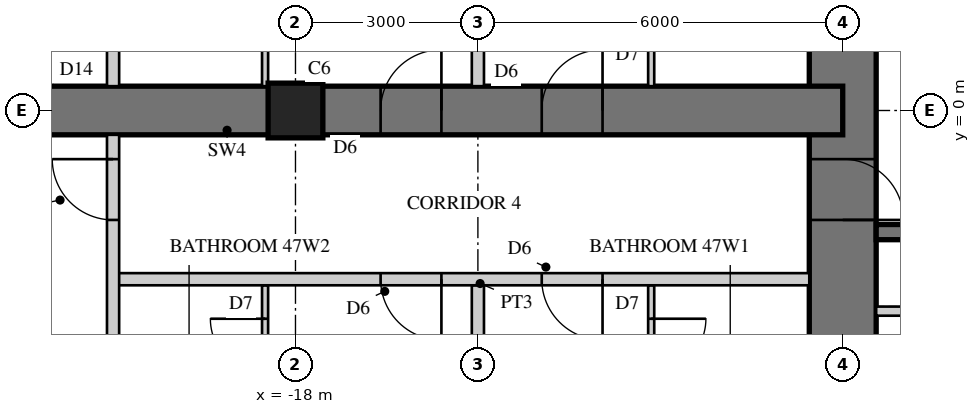
"""IFC4 building model, lengths in metres.
Left out: names, types, materials, properties, quantities, classifications, styles, units other than length and angle.
Written with IfcOpenShell. Run it as: python <this file> out.ifc"""

import sys

from ifc_helpers import new_model, si_unit, direction, frame, frame_2d, origin, origin_2d, place, context, subcontext, project, spatial, rectangle, extrude, element, fill, save


model = new_model("IFC4")
c1 = context("Model", 3, precision=1e-05, world=origin(), true_north=direction((0.0, 1.0)))
c2 = subcontext(c1, "Body", "Model", "MODEL_VIEW")
j1 = project(units=[si_unit("LENGTHUNIT", "METRE"), si_unit("PLANEANGLEUNIT", "RADIAN")], contexts=[c1])
p1 = place(None, origin())
s1 = spatial("IfcSite", under=j1, at=p1, CompositionType="ELEMENT")
p2 = place(p1, origin())
s2 = spatial("IfcBuilding", under=s1, at=p2, CompositionType="ELEMENT")
p3 = place(p2, frame((0.0, 0.0, 189.9)))
s3 = spatial("IfcBuildingStorey", under=s2, at=p3, CompositionType="ELEMENT", Elevation=189.9)
p4 = place(p3, frame((-9.0, 9.0, 0.0), z_axis=(0.0, 0.0, 1.0), x_axis=(0.0, -1.0, 0.0)))
e1 = element("IfcWall", 1, at=p4, inside=s3, PredefinedType="SHEAR", context=c2, shape_type="SweptSolid", body=[
    extrude(rectangle(XDim=18.0, YDim=1.1, at=frame_2d((9.0, 0.0))), origin(), (0.0, 0.0, 1.0), 3.4),
])
p5 = place(p4, frame((9.8, 0.0, 0.0)))
e2 = element("IfcOpeningElement", 2, at=p5, cuts=e1, PredefinedType="OPENING", context=c2, shape_type="SweptSolid", body=[
    extrude(rectangle(XDim=1.0, YDim=2.4, at=frame_2d((0.5, 1.2))), frame((0.0, 0.56, 0.0), z_axis=(0.0, -1.0, 0.0), x_axis=(1.0, 0.0, 0.0)), (0.0, 0.0, 1.0), 1.12),
])
p6 = place(p3, frame((-1.925, -2.0, 0.0), z_axis=(0.0, 0.0, 1.0), x_axis=(-1.0, 0.0, 0.0)))
e3 = element("IfcWall", 3, at=p6, inside=s3, PredefinedType="SHEAR", context=c2, shape_type="SweptSolid", body=[
    extrude(rectangle(XDim=6.525, YDim=0.25, at=frame_2d((3.262, 0.0))), origin(), (0.0, 0.0, 1.0), 3.4),
])
p7 = place(p3, frame((-1.925, -3.3, 0.0), z_axis=(0.0, 0.0, 1.0), x_axis=(-1.0, 0.0, 0.0)))
e4 = element("IfcWall", 4, at=p7, inside=s3, PredefinedType="PARTITIONING", context=c2, shape_type="SweptSolid", body=[
    extrude(rectangle(XDim=6.525, YDim=0.15, at=frame_2d((3.262, 0.0))), origin(), (0.0, 0.0, 1.0), 3.4),
])
p8 = place(p7, frame((0.075, 0.0, 0.0)))
e5 = element("IfcOpeningElement", 5, at=p8, cuts=e4, PredefinedType="OPENING", context=c2, shape_type="SweptSolid", body=[
    extrude(rectangle(XDim=0.8, YDim=2.1, at=frame_2d((0.4, 1.05))), frame((0.0, 0.085, 0.0), z_axis=(0.0, -1.0, 0.0), x_axis=(1.0, 0.0, 0.0)), (0.0, 0.0, 1.0), 0.17),
])
p9 = place(p7, frame((3.675, 0.0, 0.0)))
e6 = element("IfcOpeningElement", 6, at=p9, cuts=e4, PredefinedType="OPENING", context=c2, shape_type="SweptSolid", body=[
    extrude(rectangle(XDim=0.8, YDim=2.1, at=frame_2d((0.4, 1.05))), frame((0.0, 0.085, 0.0), z_axis=(0.0, -1.0, 0.0), x_axis=(1.0, 0.0, 0.0)), (0.0, 0.0, 1.0), 0.17),
])
p10 = place(p3, frame((-9.0, 0.0, 0.0), z_axis=(0.0, 0.0, 1.0), x_axis=(-1.0, 0.0, 0.0)))
e7 = element("IfcWall", 7, at=p10, inside=s3, PredefinedType="SHEAR", context=c2, shape_type="SweptSolid", body=[
    extrude(rectangle(XDim=18.0, YDim=0.8, at=frame_2d((9.0, 0.0))), origin(), (0.0, 0.0, 1.0), 3.4),
])
p11 = place(p10, frame((3.95, 0.0, 0.0)))
e8 = element("IfcOpeningElement", 8, at=p11, cuts=e7, PredefinedType="OPENING", context=c2, shape_type="SweptSolid", body=[
    extrude(rectangle(XDim=1.0, YDim=2.15, at=frame_2d((0.5, 1.075))), frame((0.0, 0.41, 0.0), z_axis=(0.0, -1.0, 0.0), x_axis=(1.0, 0.0, 0.0)), (0.0, 0.0, 1.0), 0.82),
])
p12 = place(p10, frame((6.6, 0.0, 0.0)))
e9 = element("IfcOpeningElement", 9, at=p12, cuts=e7, PredefinedType="OPENING", context=c2, shape_type="SweptSolid", body=[
    extrude(rectangle(XDim=1.0, YDim=2.15, at=frame_2d((0.5, 1.075))), frame((0.0, 0.41, 0.0), z_axis=(0.0, -1.0, 0.0), x_axis=(1.0, 0.0, 0.0)), (0.0, 0.0, 1.0), 0.82),
])
p13 = place(p10, frame((13.25, 0.0, 0.0)))
e10 = element("IfcOpeningElement", 10, at=p13, cuts=e7, PredefinedType="OPENING", context=c2, shape_type="SweptSolid", body=[
    extrude(rectangle(XDim=1.0, YDim=2.2, at=frame_2d((0.5, 1.1))), frame((0.0, 0.41, 0.0), z_axis=(0.0, -1.0, 0.0), x_axis=(1.0, 0.0, 0.0)), (0.0, 0.0, 1.0), 0.82),
])
p14 = place(p3, frame((-18.0, 0.0, 0.0), z_axis=(0.0, 0.0, 1.0), x_axis=(1.0, 0.0, 0.0)))
e11 = element("IfcColumn", 11, at=p14, inside=s3, PredefinedType="COLUMN", context=c2, shape_type="SweptSolid", body=[
    extrude(rectangle(XDim=0.9, YDim=0.9, at=origin_2d()), origin(), (0.0, 0.0, 1.0), 3.4),
])
p15 = place(p3, frame((-12.15, -2.875, 0.0), z_axis=(0.0, 0.0, 1.0), x_axis=(0.0, -1.0, 0.0)))
e12 = element("IfcWall", 12, at=p15, inside=s3, PredefinedType="PARTITIONING", context=c2, shape_type="SweptSolid", body=[
    extrude(rectangle(XDim=2.2, YDim=0.1, at=frame_2d((1.1, 0.0))), origin(), (0.0, 0.0, 1.0), 3.22),
])
p16 = place(p15, frame((0.55, 0.0, 0.0)))
e13 = element("IfcOpeningElement", 13, at=p16, cuts=e12, PredefinedType="OPENING", context=c2, shape_type="SweptSolid", body=[
    extrude(rectangle(XDim=0.9, YDim=2.1, at=frame_2d((0.45, 1.05))), frame((0.0, 0.06, 0.0), z_axis=(0.0, -1.0, 0.0), x_axis=(1.0, 0.0, 0.0)), (0.0, 0.0, 1.0), 0.12),
])
p17 = place(p3, frame((-12.15, 2.6, 0.0), z_axis=(0.0, 0.0, 1.0), x_axis=(0.0, -1.0, 0.0)))
e14 = element("IfcWall", 14, at=p17, inside=s3, PredefinedType="PARTITIONING", context=c2, shape_type="SweptSolid", body=[
    extrude(rectangle(XDim=2.2, YDim=0.1, at=frame_2d((1.1, 0.0))), origin(), (0.0, 0.0, 1.0), 3.22),
])
p18 = place(p17, frame((0.55, 0.0, 0.0)))
e15 = element("IfcOpeningElement", 15, at=p18, cuts=e14, PredefinedType="OPENING", context=c2, shape_type="SweptSolid", body=[
    extrude(rectangle(XDim=0.9, YDim=2.1, at=frame_2d((0.45, 1.05))), frame((0.0, 0.06, 0.0), z_axis=(0.0, -1.0, 0.0), x_axis=(1.0, 0.0, 0.0)), (0.0, 0.0, 1.0), 0.12),
])
p19 = place(p3, frame((-15.0, -2.875, 0.0), z_axis=(0.0, 0.0, 1.0), x_axis=(0.0, -1.0, 0.0)))
e16 = element("IfcWall", 16, at=p19, inside=s3, PredefinedType="SOLIDWALL", context=c2, shape_type="SweptSolid", body=[
    extrude(rectangle(XDim=5.675, YDim=0.2, at=frame_2d((2.837, 0.0))), origin(), (0.0, 0.0, 1.0), 2.47),
])
p20 = place(p3, frame((-15.0, 8.55, 0.0), z_axis=(0.0, 0.0, 1.0), x_axis=(0.0, -1.0, 0.0)))
e17 = element("IfcWall", 17, at=p20, inside=s3, PredefinedType="SOLIDWALL", context=c2, shape_type="SweptSolid", body=[
    extrude(rectangle(XDim=8.15, YDim=0.2, at=frame_2d((4.075, 0.0))), origin(), (0.0, 0.0, 1.0), 2.47),
])
p21 = place(p3, frame((-18.5, -2.875, 0.0), z_axis=(0.0, 0.0, 1.0), x_axis=(0.0, -1.0, 0.0)))
e18 = element("IfcWall", 18, at=p21, inside=s3, PredefinedType="PARTITIONING", context=c2, shape_type="SweptSolid", body=[
    extrude(rectangle(XDim=2.2, YDim=0.1, at=frame_2d((1.1, 0.0))), origin(), (0.0, 0.0, 1.0), 3.22),
])
p22 = place(p21, frame((0.55, 0.0, 0.0)))
e19 = element("IfcOpeningElement", 19, at=p22, cuts=e18, PredefinedType="OPENING", context=c2, shape_type="SweptSolid", body=[
    extrude(rectangle(XDim=0.9, YDim=2.1, at=frame_2d((0.45, 1.05))), frame((0.0, 0.06, 0.0), z_axis=(0.0, -1.0, 0.0), x_axis=(1.0, 0.0, 0.0)), (0.0, 0.0, 1.0), 0.12),
])
p23 = place(p3, frame((-18.5, 3.0, 0.0), z_axis=(0.0, 0.0, 1.0), x_axis=(0.0, -1.0, 0.0)))
e20 = element("IfcWall", 20, at=p23, inside=s3, PredefinedType="PARTITIONING", context=c2, shape_type="SweptSolid", body=[
    extrude(rectangle(XDim=2.6, YDim=0.1, at=frame_2d((1.3, 0.0))), origin(), (0.0, 0.0, 1.0), 3.22),
])
p24 = place(p23, frame((0.55, 0.0, 0.0)))
e21 = element("IfcOpeningElement", 21, at=p24, cuts=e20, PredefinedType="OPENING", context=c2, shape_type="SweptSolid", body=[
    extrude(rectangle(XDim=0.9, YDim=2.1, at=frame_2d((0.45, 1.05))), frame((0.0, 0.06, 0.0), z_axis=(0.0, -1.0, 0.0), x_axis=(1.0, 0.0, 0.0)), (0.0, 0.0, 1.0), 0.12),
])
p25 = place(p3, frame((-9.55, -2.775, 0.0), z_axis=(0.0, 0.0, 1.0), x_axis=(-1.0, 0.0, 0.0)))
e22 = element("IfcWall", 22, at=p25, inside=s3, PredefinedType="SOLIDWALL", context=c2, shape_type="SweptSolid", body=[
    extrude(rectangle(XDim=11.45, YDim=0.2, at=frame_2d((5.725, 0.0))), origin(), (0.0, 0.0, 1.0), 3.22),
])
p26 = place(p25, frame((3.4, 0.0, 0.0)))
e23 = element("IfcOpeningElement", 23, at=p26, cuts=e22, PredefinedType="OPENING", context=c2, shape_type="SweptSolid", body=[
    extrude(rectangle(XDim=1.0, YDim=2.15, at=frame_2d((0.5, 1.075))), frame((0.0, 0.11, 0.0), z_axis=(0.0, -1.0, 0.0), x_axis=(1.0, 0.0, 0.0)), (0.0, 0.0, 1.0), 0.22),
])
p27 = place(p25, frame((6.05, 0.0, 0.0)))
e24 = element("IfcOpeningElement", 24, at=p27, cuts=e22, PredefinedType="OPENING", context=c2, shape_type="SweptSolid", body=[
    extrude(rectangle(XDim=1.0, YDim=2.15, at=frame_2d((0.5, 1.075))), frame((0.0, 0.11, 0.0), z_axis=(0.0, -1.0, 0.0), x_axis=(1.0, 0.0, 0.0)), (0.0, 0.0, 1.0), 0.22),
])
p28 = place(p3, frame((-21.0, 9.0, 0.0), z_axis=(0.0, 0.0, 1.0), x_axis=(0.0, -1.0, 0.0)))
e25 = element("IfcWall", 25, at=p28, inside=s3, PredefinedType="SOLIDWALL", context=c2, shape_type="SweptSolid", body=[
    extrude(rectangle(XDim=8.6, YDim=0.2, at=frame_2d((4.3, 0.0))), origin(), (0.0, 0.0, 1.0), 2.62),
])
p29 = place(p3, frame((-21.0, -0.4, 0.0), z_axis=(0.0, 0.0, 1.0), x_axis=(0.0, -1.0, 0.0)))
e26 = element("IfcWall", 26, at=p29, inside=s3, PredefinedType="SOLIDWALL", context=c2, shape_type="SweptSolid", body=[
    extrude(rectangle(XDim=8.6, YDim=0.2, at=frame_2d((4.3, 0.0))), origin(), (0.0, 0.0, 1.0), 2.62),
])
p30 = place(p29, frame((0.4, 0.0, 0.0)))
e27 = element("IfcOpeningElement", 27, at=p30, cuts=e26, PredefinedType="OPENING", context=c2, shape_type="SweptSolid", body=[
    extrude(rectangle(XDim=1.0, YDim=2.2, at=frame_2d((0.5, 1.1))), frame((0.0, 0.11, 0.0), z_axis=(0.0, -1.0, 0.0), x_axis=(1.0, 0.0, 0.0)), (0.0, 0.0, 1.0), 0.22),
])
p31 = place(p16, origin())
e28 = element("IfcDoor", 28, at=p31, inside=s3, OperationType="SINGLE_SWING_LEFT", PredefinedType="DOOR", context=c2, shape_type="SweptSolid", body=[
    extrude(rectangle(XDim=0.9, YDim=2.1, at=frame_2d((0.45, 1.05))), frame((0.0, 0.025, 0.0), z_axis=(0.0, -1.0, 0.0), x_axis=(1.0, 0.0, 0.0)), (0.0, 0.0, 1.0), 0.05),
])
fill(e13, e28)
p32 = place(p22, frame((0.9, 0.0, 0.0), z_axis=(0.0, 0.0, 1.0), x_axis=(-1.0, 0.0, 0.0)))
e29 = element("IfcDoor", 29, at=p32, inside=s3, OperationType="SINGLE_SWING_RIGHT", PredefinedType="DOOR", context=c2, shape_type="SweptSolid", body=[
    extrude(rectangle(XDim=0.9, YDim=2.1, at=frame_2d((0.45, 1.05))), frame((0.0, 0.025, 0.0), z_axis=(0.0, -1.0, 0.0), x_axis=(1.0, 0.0, 0.0)), (0.0, 0.0, 1.0), 0.05),
])
fill(e19, e29)
p33 = place(p26, origin())
e30 = element("IfcDoor", 30, at=p33, inside=s3, OperationType="SINGLE_SWING_LEFT", PredefinedType="DOOR", context=c2, shape_type="SweptSolid", body=[
    extrude(rectangle(XDim=1.0, YDim=2.15, at=frame_2d((0.5, 1.075))), frame((0.0, 0.025, 0.0), z_axis=(0.0, -1.0, 0.0), x_axis=(1.0, 0.0, 0.0)), (0.0, 0.0, 1.0), 0.05),
])
fill(e23, e30)
p34 = place(p27, origin())
e31 = element("IfcDoor", 31, at=p34, inside=s3, OperationType="SINGLE_SWING_LEFT", PredefinedType="DOOR", context=c2, shape_type="SweptSolid", body=[
    extrude(rectangle(XDim=1.0, YDim=2.15, at=frame_2d((0.5, 1.075))), frame((0.0, 0.025, 0.0), z_axis=(0.0, -1.0, 0.0), x_axis=(1.0, 0.0, 0.0)), (0.0, 0.0, 1.0), 0.05),
])
fill(e24, e31)
p35 = place(p30, frame((1.0, 0.0, 0.0), z_axis=(0.0, 0.0, 1.0), x_axis=(-1.0, 0.0, 0.0)))
e32 = element("IfcDoor", 32, at=p35, inside=s3, OperationType="SINGLE_SWING_RIGHT", PredefinedType="DOOR", context=c2, shape_type="SweptSolid", body=[
    extrude(rectangle(XDim=1.0, YDim=2.2, at=frame_2d((0.5, 1.1))), frame((0.0, 0.025, 0.0), z_axis=(0.0, -1.0, 0.0), x_axis=(1.0, 0.0, 0.0)), (0.0, 0.0, 1.0), 0.05),
])
fill(e27, e32)
p36 = place(p11, frame((1.0, 0.0, 0.0), z_axis=(0.0, 0.0, 1.0), x_axis=(-1.0, 0.0, 0.0)))
e33 = element("IfcDoor", 33, at=p36, inside=s3, OperationType="SINGLE_SWING_RIGHT", PredefinedType="DOOR", context=c2, shape_type="SweptSolid", body=[
    extrude(rectangle(XDim=1.0, YDim=2.15, at=frame_2d((0.5, 1.075))), frame((0.0, 0.025, 0.0), z_axis=(0.0, -1.0, 0.0), x_axis=(1.0, 0.0, 0.0)), (0.0, 0.0, 1.0), 0.05),
])
fill(e8, e33)
p37 = place(p12, frame((1.0, 0.0, 0.0), z_axis=(0.0, 0.0, 1.0), x_axis=(-1.0, 0.0, 0.0)))
e34 = element("IfcDoor", 34, at=p37, inside=s3, OperationType="SINGLE_SWING_RIGHT", PredefinedType="DOOR", context=c2, shape_type="SweptSolid", body=[
    extrude(rectangle(XDim=1.0, YDim=2.15, at=frame_2d((0.5, 1.075))), frame((0.0, 0.025, 0.0), z_axis=(0.0, -1.0, 0.0), x_axis=(1.0, 0.0, 0.0)), (0.0, 0.0, 1.0), 0.05),
])
fill(e9, e34)
p38 = place(p5, origin())
e35 = element("IfcDoor", 35, at=p38, inside=s3, OperationType="SINGLE_SWING_RIGHT", PredefinedType="DOOR", context=c2, shape_type="SweptSolid", body=[
    extrude(rectangle(XDim=1.0, YDim=2.4, at=frame_2d((0.5, 1.2))), frame((0.0, 0.055, 0.0), z_axis=(0.0, -1.0, 0.0), x_axis=(1.0, 0.0, 0.0)), (0.0, 0.0, 1.0), 0.05),
])
fill(e2, e35)
save(model, sys.argv[1])
